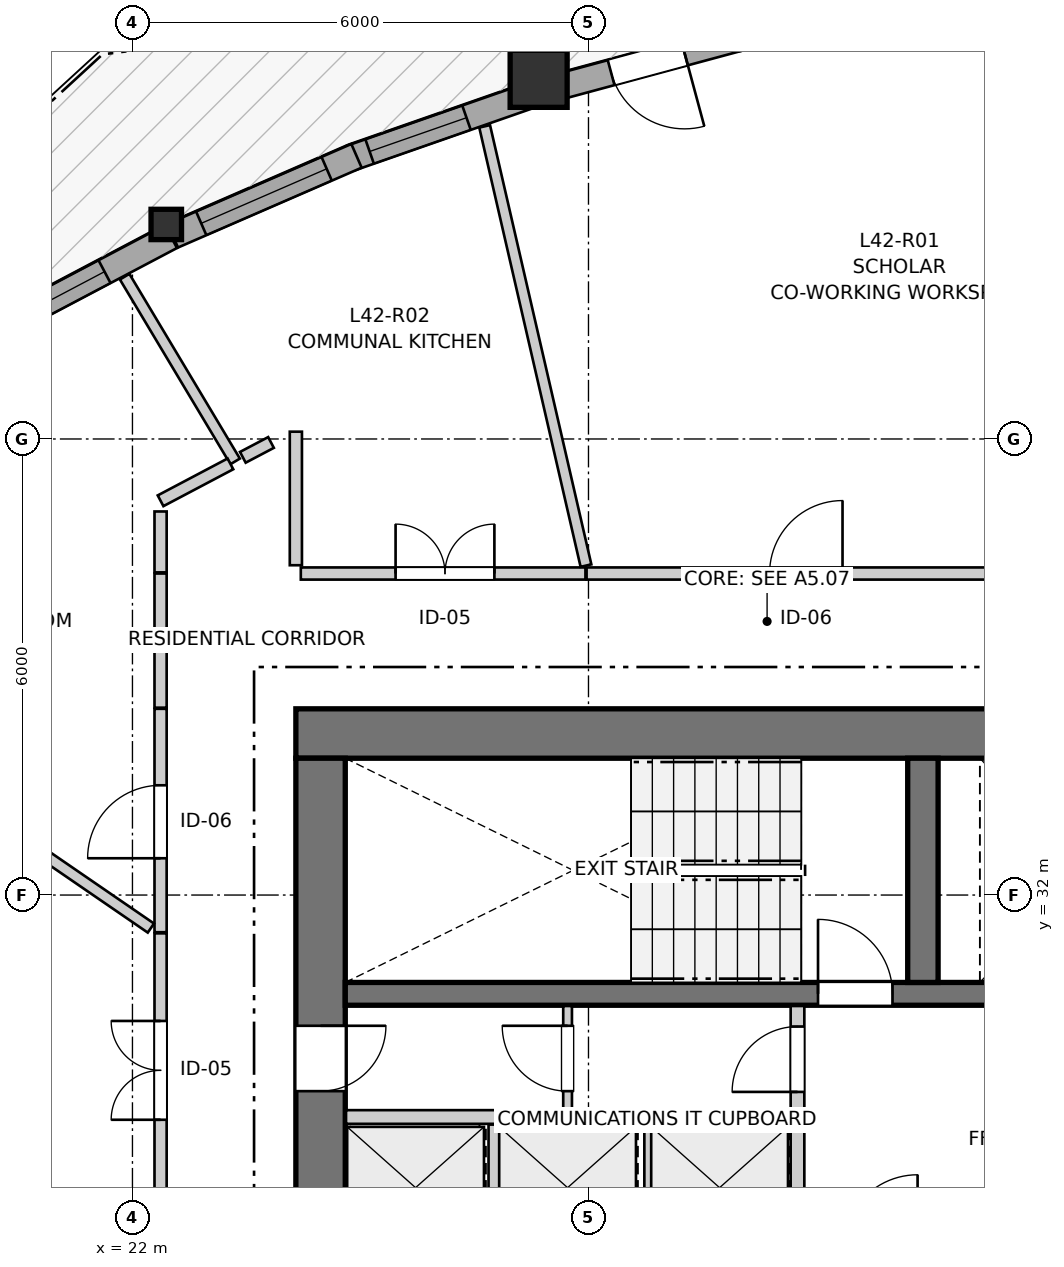
"""IFC4 building model, lengths in metres.
Left out: names, types, materials, properties, quantities, classifications, styles, units other than length and angle.
Written with IfcOpenShell. Run it as: python <this file> out.ifc"""

import sys

from ifc_helpers import new_model, si_unit, direction, frame, frame_2d, origin, origin_2d, place, context, subcontext, project, spatial, rectangle, i_section, extrude, source, transform, mapped, element, fill, save


model = new_model("IFC4")
c1 = context("Model", 3, precision=1e-05, world=origin(), true_north=direction((0.0, 1.0)))
c2 = subcontext(c1, "Body", "Model", "MODEL_VIEW")
j1 = project(units=[si_unit("LENGTHUNIT", "METRE"), si_unit("PLANEANGLEUNIT", "RADIAN")], contexts=[c1])
p1 = place(None, origin())
s1 = spatial("IfcSite", under=j1, at=p1, CompositionType="ELEMENT")
p2 = place(p1, origin())
s2 = spatial("IfcBuilding", under=s1, at=p2, CompositionType="ELEMENT")
p3 = place(p2, frame((0.0, 0.0, 142.6)))
s3 = spatial("IfcBuildingStorey", under=s2, at=p3, CompositionType="ELEMENT", Elevation=142.6)
p4 = place(p3, frame((36.55, 34.125, 0.0), z_axis=(0.0, 0.0, 1.0), x_axis=(-1.0, 0.0, 0.0)))
e1 = element("IfcWall", 1, at=p4, inside=s3, PredefinedType="SHEAR", context=c2, shape_type="SweptSolid", body=[
    extrude(rectangle(XDim=12.4, YDim=0.65, at=frame_2d((6.2, 0.0))), origin(), (0.0, 0.0, 1.0), 2.95),
])
p5 = place(p3, frame((24.475, 33.8, 0.0), z_axis=(0.0, 0.0, 1.0), x_axis=(0.0, -1.0, 0.0)))
e2 = element("IfcWall", 2, at=p5, inside=s3, PredefinedType="SHEAR", context=c2, shape_type="SweptSolid", body=[
    extrude(rectangle(XDim=15.6, YDim=0.65, at=frame_2d((7.8, 0.0))), origin(), (0.0, 0.0, 1.0), 2.95),
])
p6 = place(p5, frame((7.05, 0.0, 0.0)))
e3 = element("IfcOpeningElement", 3, at=p6, cuts=e2, PredefinedType="OPENING", context=c2, shape_type="SweptSolid", body=[
    extrude(rectangle(XDim=1.5, YDim=2.15, at=frame_2d((0.75, 1.075))), frame((0.0, 0.335, 0.0), z_axis=(0.0, -1.0, 0.0), x_axis=(1.0, 0.0, 0.0)), (0.0, 0.0, 1.0), 0.67),
])
p7 = place(p5, frame((3.52, 0.0, 0.0)))
e4 = element("IfcOpeningElement", 4, at=p7, cuts=e2, PredefinedType="OPENING", context=c2, shape_type="SweptSolid", body=[
    extrude(rectangle(XDim=0.86, YDim=2.05, at=frame_2d((0.43, 1.025))), frame((0.0, 0.335, 0.0), z_axis=(0.0, -1.0, 0.0), x_axis=(1.0, 0.0, 0.0)), (0.0, 0.0, 1.0), 0.67),
])
p8 = place(p5, frame((11.22, 0.0, 0.0)))
e5 = element("IfcOpeningElement", 5, at=p8, cuts=e2, PredefinedType="OPENING", context=c2, shape_type="SweptSolid", body=[
    extrude(rectangle(XDim=0.86, YDim=2.05, at=frame_2d((0.43, 1.025))), frame((0.0, 0.335, 0.0), z_axis=(0.0, -1.0, 0.0), x_axis=(1.0, 0.0, 0.0)), (0.0, 0.0, 1.0), 0.67),
])
p9 = place(p3, frame((24.8, 30.7, 0.0), z_axis=(0.0, 0.0, 1.0), x_axis=(1.0, 0.0, 0.0)))
e6 = element("IfcWall", 6, at=p9, inside=s3, PredefinedType="SHEAR", context=c2, shape_type="SweptSolid", body=[
    extrude(rectangle(XDim=11.1, YDim=0.3, at=frame_2d((5.55, 0.0))), origin(), (0.0, 0.0, 1.0), 2.95),
])
p10 = place(p9, frame((6.22, 0.0, 0.0)))
e7 = element("IfcOpeningElement", 7, at=p10, cuts=e6, PredefinedType="OPENING", context=c2, shape_type="SweptSolid", body=[
    extrude(rectangle(XDim=0.98, YDim=2.15, at=frame_2d((0.49, 1.075))), frame((0.0, 0.16, 0.0), z_axis=(0.0, -1.0, 0.0), x_axis=(1.0, 0.0, 0.0)), (0.0, 0.0, 1.0), 0.32),
])
p11 = place(p9, frame((9.15, 0.0, 0.0)))
e8 = element("IfcOpeningElement", 8, at=p11, cuts=e6, PredefinedType="OPENING", context=c2, shape_type="SweptSolid", body=[
    extrude(rectangle(XDim=1.15, YDim=2.15, at=frame_2d((0.575, 1.075))), frame((0.0, 0.16, 0.0), z_axis=(0.0, -1.0, 0.0), x_axis=(1.0, 0.0, 0.0)), (0.0, 0.0, 1.0), 0.32),
])
p12 = place(p3, frame((32.4, 30.85, 0.0), z_axis=(0.0, 0.0, 1.0), x_axis=(0.0, 1.0, 0.0)))
e9 = element("IfcWall", 9, at=p12, inside=s3, PredefinedType="SHEAR", context=c2, shape_type="SweptSolid", body=[
    extrude(rectangle(XDim=2.95, YDim=0.4, at=frame_2d((1.475, 0.0))), origin(), (0.0, 0.0, 1.0), 2.95),
])
m1 = source(origin(), c2, "Body", "SweptSolid", [
    extrude(rectangle(XDim=0.75, YDim=0.75, at=origin_2d()), origin(), (0.0, 0.0, 1.0), 2.95),
])
p13 = place(p3, frame((27.344, 42.738, 0.0), z_axis=(0.0, 0.0, 1.0), x_axis=(1.0, 0.0, 0.0)))
e10 = element("IfcColumn", 10, at=p13, inside=s3, PredefinedType="COLUMN", context=c2, shape_type="MappedRepresentation", body=[
    mapped(m1, transform((0.0, 0.0, 0.0), x_axis=(1.0, 0.0, 0.0), y_axis=(0.0, 1.0, 0.0), z_axis=(0.0, 0.0, 1.0), scale=1.0)),
])
m2 = source(origin(), c2, "Body", "SweptSolid", [
    extrude(i_section(OverallWidth=0.401, OverallDepth=0.399, WebThickness=0.023, FlangeThickness=0.036, FilletRadius=0.015, at=origin_2d()), origin(), (0.0, 0.0, 1.0), 2.95),
])
p14 = place(p3, frame((22.445, 40.822, 0.0), z_axis=(0.0, 0.0, 1.0), x_axis=(1.0, 0.0, 0.0)))
e11 = element("IfcColumn", 11, at=p14, inside=s3, PredefinedType="PILASTER", context=c2, shape_type="MappedRepresentation", body=[
    mapped(m2, transform((0.0, 0.0, 0.0), x_axis=(1.0, 0.0, 0.0), y_axis=(0.0, 1.0, 0.0), z_axis=(0.0, 0.0, 1.0), scale=1.0)),
])
p15 = place(p3, frame((30.023, 43.285, 0.0), z_axis=(0.0, 0.0, 1.0), x_axis=(-0.965478241218, -0.260483714913, 0.0)))
e12 = element("IfcWall", 12, at=p15, inside=s3, PredefinedType="SOLIDWALL", context=c2, shape_type="SweptSolid", body=[
    extrude(rectangle(XDim=2.574, YDim=0.34, at=frame_2d((1.287, 0.0))), origin(), (0.0, 0.0, 1.0), 2.53),
])
p16 = place(p15, frame((0.787, 0.0, 0.0)))
e13 = element("IfcOpeningElement", 13, at=p16, cuts=e12, PredefinedType="OPENING", context=c2, shape_type="SweptSolid", body=[
    extrude(rectangle(XDim=1.0, YDim=2.1, at=frame_2d((0.5, 1.05))), frame((0.0, 0.18, 0.0), z_axis=(0.0, -1.0, 0.0), x_axis=(1.0, 0.0, 0.0)), (0.0, 0.0, 1.0), 0.36),
])
p17 = place(p3, frame((27.254, 42.527, 0.0), z_axis=(0.0, 0.0, 1.0), x_axis=(-0.944140843313, -0.329542209721, 0.0)))
e14 = element("IfcWall", 14, at=p17, inside=s3, PredefinedType="SOLIDWALL", context=c2, shape_type="SweptSolid", body=[
    extrude(rectangle(XDim=2.53, YDim=0.34, at=frame_2d((1.265, 0.0))), origin(), (0.0, 0.0, 1.0), 2.53),
])
p18 = place(p17, frame((0.909, 0.0, 0.82)))
e15 = element("IfcOpeningElement", 15, at=p18, cuts=e14, PredefinedType="OPENING", context=c2, shape_type="SweptSolid", body=[
    extrude(rectangle(XDim=1.35, YDim=1.45, at=frame_2d((0.675, 0.725))), frame((0.0, 0.18, 0.0), z_axis=(0.0, -1.0, 0.0), x_axis=(1.0, 0.0, 0.0)), (0.0, 0.0, 1.0), 0.36),
])
p19 = place(p3, frame((24.948, 41.725, 0.0), z_axis=(0.0, 0.0, 1.0), x_axis=(-0.917067110524, -0.398732886523, 0.0)))
e16 = element("IfcWall", 16, at=p19, inside=s3, PredefinedType="SOLIDWALL", context=c2, shape_type="SweptSolid", body=[
    extrude(rectangle(XDim=2.635, YDim=0.34, at=frame_2d((1.318, 0.0))), origin(), (0.0, 0.0, 1.0), 2.53),
])
p20 = place(p19, frame((0.427, 0.0, 0.82)))
e17 = element("IfcOpeningElement", 17, at=p20, cuts=e16, PredefinedType="OPENING", context=c2, shape_type="SweptSolid", body=[
    extrude(rectangle(XDim=1.8, YDim=1.45, at=frame_2d((0.9, 0.725))), frame((0.0, 0.18, 0.0), z_axis=(0.0, -1.0, 0.0), x_axis=(1.0, 0.0, 0.0)), (0.0, 0.0, 1.0), 0.36),
])
p21 = place(p3, frame((22.507, 40.663, 0.0), z_axis=(0.0, 0.0, 1.0), x_axis=(-0.884410392718, -0.466710035517, 0.0)))
e18 = element("IfcWall", 18, at=p21, inside=s3, PredefinedType="SOLIDWALL", context=c2, shape_type="SweptSolid", body=[
    extrude(rectangle(XDim=2.62, YDim=0.34, at=frame_2d((1.31, 0.0))), origin(), (0.0, 0.0, 1.0), 2.53),
])
p22 = place(p21, frame((0.988, 0.0, 0.82)))
e19 = element("IfcOpeningElement", 19, at=p22, cuts=e18, PredefinedType="OPENING", context=c2, shape_type="SweptSolid", body=[
    extrude(rectangle(XDim=1.35, YDim=1.45, at=frame_2d((0.675, 0.725))), frame((0.0, 0.18, 0.0), z_axis=(0.0, -1.0, 0.0), x_axis=(1.0, 0.0, 0.0)), (0.0, 0.0, 1.0), 0.36),
])
p23 = place(p3, frame((30.75, 27.43, 0.0), z_axis=(0.0, 0.0, 1.0), x_axis=(0.0, 1.0, 0.0)))
e20 = element("IfcWall", 20, at=p23, inside=s3, PredefinedType="PARTITIONING", context=c2, shape_type="SweptSolid", body=[
    extrude(rectangle(XDim=3.11, YDim=0.18, at=frame_2d((1.555, 0.0))), origin(), (0.0, 0.0, 1.0), 2.95),
])
p24 = place(p23, frame((1.98, 0.0, 0.0)))
e21 = element("IfcOpeningElement", 21, at=p24, cuts=e20, PredefinedType="OPENING", context=c2, shape_type="SweptSolid", body=[
    extrude(rectangle(XDim=0.86, YDim=2.05, at=frame_2d((0.43, 1.025))), frame((0.0, 0.1, 0.0), z_axis=(0.0, -1.0, 0.0), x_axis=(1.0, 0.0, 0.0)), (0.0, 0.0, 1.0), 0.2),
])
p25 = place(p3, frame((24.81, 29.08, 0.0), z_axis=(0.0, 0.0, 1.0), x_axis=(1.0, 0.0, 0.0)))
e22 = element("IfcWall", 22, at=p25, inside=s3, PredefinedType="PARTITIONING", context=c2, shape_type="SweptSolid", body=[
    extrude(rectangle(XDim=5.84, YDim=0.18, at=frame_2d((2.92, 0.0))), origin(), (0.0, 0.0, 1.0), 2.95),
])
for number, where, z_axis, x_axis in (
    (23, (26.775, 27.2, 0.0), (0.0, 0.0, 1.0), (0.0, 1.0, 0.0)),
    (24, (28.825, 27.2, 0.0), (0.0, 0.0, 1.0), (0.0, 1.0, 0.0)),
):
    element("IfcWall", number, at=place(p3, frame(where, z_axis=z_axis, x_axis=x_axis)), inside=s3, PredefinedType="PARTITIONING", context=c2, shape_type="SweptSolid", body=[
        extrude(rectangle(XDim=1.78, YDim=0.18, at=frame_2d((0.89, 0.0))), origin(), (0.0, 0.0, 1.0), 2.95),
    ])
p26 = place(p3, frame((27.725, 29.16, 0.0), z_axis=(0.0, 0.0, 1.0), x_axis=(0.0, 1.0, 0.0)))
e25 = element("IfcWall", 25, at=p26, inside=s3, PredefinedType="PARTITIONING", context=c2, shape_type="SweptSolid", body=[
    extrude(rectangle(XDim=1.38, YDim=0.115, at=frame_2d((0.69, 0.0))), origin(), (0.0, 0.0, 1.0), 2.95),
])
p27 = place(p26, frame((0.26, 0.0, 0.0)))
e26 = element("IfcOpeningElement", 26, at=p27, cuts=e25, PredefinedType="OPENING", context=c2, shape_type="SweptSolid", body=[
    extrude(rectangle(XDim=0.86, YDim=2.05, at=frame_2d((0.43, 1.025))), frame((0.0, 0.067, 0.0), z_axis=(0.0, -1.0, 0.0), x_axis=(1.0, 0.0, 0.0)), (0.0, 0.0, 1.0), 0.135),
])
p28 = place(p3, frame((27.975, 36.23, 0.0), z_axis=(0.0, 0.0, 1.0), x_axis=(1.0, 0.0, 0.0)))
e27 = element("IfcWall", 27, at=p28, inside=s3, PredefinedType="PARTITIONING", context=c2, shape_type="SweptSolid", body=[
    extrude(rectangle(XDim=5.775, YDim=0.16, at=frame_2d((2.887, 0.0))), origin(), (0.0, 0.0, 1.0), 2.588),
])
p29 = place(p28, frame((2.407, 0.0, 0.0)))
e28 = element("IfcOpeningElement", 28, at=p29, cuts=e27, PredefinedType="OPENING", context=c2, shape_type="SweptSolid", body=[
    extrude(rectangle(XDim=0.96, YDim=2.1, at=frame_2d((0.48, 1.05))), frame((0.0, 0.09, 0.0), z_axis=(0.0, -1.0, 0.0), x_axis=(1.0, 0.0, 0.0)), (0.0, 0.0, 1.0), 0.18),
])
p30 = place(p3, frame((24.215, 36.23, 0.0), z_axis=(0.0, 0.0, 1.0), x_axis=(1.0, 0.0, 0.0)))
e29 = element("IfcWall", 29, at=p30, inside=s3, PredefinedType="PARTITIONING", context=c2, shape_type="SweptSolid", body=[
    extrude(rectangle(XDim=3.745, YDim=0.16, at=frame_2d((1.873, 0.0))), origin(), (0.0, 0.0, 1.0), 2.95),
])
p31 = place(p30, frame((1.247, 0.0, 0.0)))
e30 = element("IfcOpeningElement", 30, at=p31, cuts=e29, PredefinedType="OPENING", context=c2, shape_type="SweptSolid", body=[
    extrude(rectangle(XDim=1.3, YDim=2.1, at=frame_2d((0.65, 1.05))), frame((0.0, 0.09, 0.0), z_axis=(0.0, -1.0, 0.0), x_axis=(1.0, 0.0, 0.0)), (0.0, 0.0, 1.0), 0.18),
])
p32 = place(p3, frame((22.37, 27.85, 0.0), z_axis=(0.0, 0.0, 1.0), x_axis=(0.0, 1.0, 0.0)))
e31 = element("IfcWall", 31, at=p32, inside=s3, PredefinedType="PARTITIONING", context=c2, shape_type="SweptSolid", body=[
    extrude(rectangle(XDim=3.646, YDim=0.16, at=frame_2d((1.823, 0.0))), origin(), (0.0, 0.0, 1.0), 2.95),
])
p33 = place(p32, frame((1.194, 0.0, 0.0)))
e32 = element("IfcOpeningElement", 32, at=p33, cuts=e31, PredefinedType="OPENING", context=c2, shape_type="SweptSolid", body=[
    extrude(rectangle(XDim=1.3, YDim=2.1, at=frame_2d((0.65, 1.05))), frame((0.0, 0.09, 0.0), z_axis=(0.0, -1.0, 0.0), x_axis=(1.0, 0.0, 0.0)), (0.0, 0.0, 1.0), 0.18),
])
p34 = place(p3, frame((22.37, 31.511, 0.0), z_axis=(0.0, 0.0, 1.0), x_axis=(0.0, 1.0, 0.0)))
e33 = element("IfcWall", 33, at=p34, inside=s3, PredefinedType="PARTITIONING", context=c2, shape_type="SweptSolid", body=[
    extrude(rectangle(XDim=2.939, YDim=0.16, at=frame_2d((1.469, 0.0))), origin(), (0.0, 0.0, 1.0), 2.95),
])
p35 = place(p34, frame((0.973, 0.0, 0.0)))
e34 = element("IfcOpeningElement", 34, at=p35, cuts=e33, PredefinedType="OPENING", context=c2, shape_type="SweptSolid", body=[
    extrude(rectangle(XDim=0.96, YDim=2.1, at=frame_2d((0.48, 1.05))), frame((0.0, 0.09, 0.0), z_axis=(0.0, -1.0, 0.0), x_axis=(1.0, 0.0, 0.0)), (0.0, 0.0, 1.0), 0.18),
])
p36 = place(p3, frame((15.696, 36.06, 0.0), z_axis=(0.0, 0.0, 1.0), x_axis=(0.824423900824, -0.565972818914, 0.0)))
e35 = element("IfcWall", 35, at=p36, inside=s3, PredefinedType="PARTITIONING", context=c2, shape_type="SweptSolid", body=[
    extrude(rectangle(XDim=7.941, YDim=0.145, at=frame_2d((3.97, 0.0))), origin(), (0.0, 0.0, 1.0), 2.95),
])
p37 = place(p3, frame((26.634, 42.113, 0.0), z_axis=(0.0, 0.0, 1.0), x_axis=(0.224790361783, -0.97440714963, 0.0)))
e36 = element("IfcWall", 36, at=p37, inside=s3, PredefinedType="PARTITIONING", context=c2, shape_type="SweptSolid", body=[
    extrude(rectangle(XDim=5.931, YDim=0.145, at=frame_2d((2.966, 0.0))), origin(), (0.0, 0.0, 1.0), 2.95),
])
p38 = place(p3, frame((21.897, 40.135, 0.0), z_axis=(0.0, 0.0, 1.0), x_axis=(0.513392323606, -0.858154020012, 0.0)))
e37 = element("IfcWall", 37, at=p38, inside=s3, PredefinedType="PARTITIONING", context=c2, shape_type="SweptSolid", body=[
    extrude(rectangle(XDim=2.832, YDim=0.145, at=frame_2d((1.416, 0.0))), origin(), (0.0, 0.0, 1.0), 2.95),
])
p39 = place(p3, frame((22.37, 34.465, 0.0), z_axis=(0.0, 0.0, 1.0), x_axis=(0.0, 1.0, 0.0)))
e38 = element("IfcWall", 38, at=p39, inside=s3, PredefinedType="PARTITIONING", context=c2, shape_type="SweptSolid", body=[
    extrude(rectangle(XDim=1.765, YDim=0.16, at=frame_2d((0.882, 0.0))), origin(), (0.0, 0.0, 1.0), 2.95),
])
p40 = place(p3, frame((24.15, 36.339, 0.0), z_axis=(0.0, 0.0, 1.0), x_axis=(0.0, 1.0, 0.0)))
e39 = element("IfcWall", 39, at=p40, inside=s3, PredefinedType="PARTITIONING", context=c2, shape_type="SweptSolid", body=[
    extrude(rectangle(XDim=1.757, YDim=0.16, at=frame_2d((0.878, 0.0))), origin(), (0.0, 0.0, 1.0), 2.95),
])
p41 = place(p3, frame((22.37, 37.187, 0.0), z_axis=(0.0, 0.0, 1.0), x_axis=(0.884244639112, 0.467024001741, 0.0)))
e40 = element("IfcWall", 40, at=p41, inside=s3, PredefinedType="PARTITIONING", context=c2, shape_type="SweptSolid", body=[
    extrude(rectangle(XDim=1.039, YDim=0.16, at=frame_2d((0.52, 0.0))), origin(), (0.0, 0.0, 1.0), 2.558),
])
p42 = place(p3, frame((22.37, 36.245, 0.0), z_axis=(0.0, 0.0, 1.0), x_axis=(0.0, 1.0, 0.0)))
e41 = element("IfcWall", 41, at=p42, inside=s3, PredefinedType="PARTITIONING", context=c2, shape_type="SweptSolid", body=[
    extrude(rectangle(XDim=0.801, YDim=0.16, at=frame_2d((0.401, 0.0))), origin(), (0.0, 0.0, 1.0), 2.95),
])
p43 = place(p3, frame((23.452, 37.759, 0.0), z_axis=(0.0, 0.0, 1.0), x_axis=(0.884665257528, 0.466226749686, 0.0)))
e42 = element("IfcWall", 42, at=p43, inside=s3, PredefinedType="PARTITIONING", context=c2, shape_type="SweptSolid", body=[
    extrude(rectangle(XDim=0.419, YDim=0.16, at=frame_2d((0.209, 0.0))), origin(), (0.0, 0.0, 1.0), 2.558),
])
m3 = source(origin(), c2, "Body", "SweptSolid", [
    extrude(rectangle(XDim=1.35, YDim=1.45, at=frame_2d((0.675, 0.725))), frame((0.0, 0.03, 0.0), z_axis=(0.0, -1.0, 0.0), x_axis=(1.0, 0.0, 0.0)), (0.0, 0.0, 1.0), 0.06),
])
p44 = place(p18, origin())
e43 = element("IfcWindow", 43, at=p44, inside=s3, PartitioningType="SINGLE_PANEL", PredefinedType="WINDOW", context=c2, shape_type="MappedRepresentation", body=[
    mapped(m3, transform((0.0, 0.0, 0.0), x_axis=(1.0, 0.0, 0.0), y_axis=(0.0, 1.0, 0.0), z_axis=(0.0, 0.0, 1.0), scale=1.0)),
])
fill(e15, e43)
m4 = source(origin(), c2, "Body", "SweptSolid", [
    extrude(rectangle(XDim=1.8, YDim=1.45, at=frame_2d((0.9, 0.725))), frame((0.0, 0.03, 0.0), z_axis=(0.0, -1.0, 0.0), x_axis=(1.0, 0.0, 0.0)), (0.0, 0.0, 1.0), 0.06),
])
p45 = place(p20, origin())
e44 = element("IfcWindow", 44, at=p45, inside=s3, PartitioningType="SINGLE_PANEL", PredefinedType="WINDOW", context=c2, shape_type="MappedRepresentation", body=[
    mapped(m4, transform((0.0, 0.0, 0.0), x_axis=(1.0, 0.0, 0.0), y_axis=(0.0, 1.0, 0.0), z_axis=(0.0, 0.0, 1.0), scale=1.0)),
])
fill(e17, e44)
p46 = place(p22, origin())
e45 = element("IfcWindow", 45, at=p46, inside=s3, PartitioningType="SINGLE_PANEL", PredefinedType="WINDOW", context=c2, shape_type="MappedRepresentation", body=[
    mapped(m3, transform((0.0, 0.0, 0.0), x_axis=(1.0, 0.0, 0.0), y_axis=(0.0, 1.0, 0.0), z_axis=(0.0, 0.0, 1.0), scale=1.0)),
])
fill(e19, e45)
m5 = source(origin(), c2, "Body", "SweptSolid", [
    extrude(rectangle(XDim=1.0, YDim=2.1, at=frame_2d((0.5, 1.05))), frame((0.0, 0.025, 0.0), z_axis=(0.0, -1.0, 0.0), x_axis=(1.0, 0.0, 0.0)), (0.0, 0.0, 1.0), 0.05),
])
p47 = place(p16, origin())
e46 = element("IfcDoor", 46, at=p47, inside=s3, OperationType="SINGLE_SWING_LEFT", PredefinedType="DOOR", context=c2, shape_type="MappedRepresentation", body=[
    mapped(m5, transform((0.0, 0.0, 0.0), x_axis=(1.0, 0.0, 0.0), y_axis=(0.0, 1.0, 0.0), z_axis=(0.0, 0.0, 1.0), scale=1.0)),
])
fill(e13, e46)
m6 = source(origin(), c2, "Body", "SweptSolid", [
    extrude(rectangle(XDim=0.98, YDim=2.15, at=frame_2d((0.49, 1.075))), frame((0.0, 0.025, 0.0), z_axis=(0.0, -1.0, 0.0), x_axis=(1.0, 0.0, 0.0)), (0.0, 0.0, 1.0), 0.05),
])
p48 = place(p10, origin())
e47 = element("IfcDoor", 47, at=p48, inside=s3, OperationType="SINGLE_SWING_LEFT", PredefinedType="DOOR", context=c2, shape_type="MappedRepresentation", body=[
    mapped(m6, transform((0.0, 0.0, 0.0), x_axis=(1.0, 0.0, 0.0), y_axis=(0.0, 1.0, 0.0), z_axis=(0.0, 0.0, 1.0), scale=1.0)),
])
fill(e7, e47)
m7 = source(origin(), c2, "Body", "SweptSolid", [
    extrude(rectangle(XDim=0.86, YDim=2.05, at=frame_2d((0.43, 1.025))), frame((0.0, 0.025, 0.0), z_axis=(0.0, -1.0, 0.0), x_axis=(1.0, 0.0, 0.0)), (0.0, 0.0, 1.0), 0.05),
])
p49 = place(p7, origin())
e48 = element("IfcDoor", 48, at=p49, inside=s3, OperationType="SINGLE_SWING_LEFT", PredefinedType="DOOR", context=c2, shape_type="MappedRepresentation", body=[
    mapped(m7, transform((0.0, 0.0, 0.0), x_axis=(1.0, 0.0, 0.0), y_axis=(0.0, 1.0, 0.0), z_axis=(0.0, 0.0, 1.0), scale=1.0)),
])
fill(e4, e48)
p50 = place(p24, origin())
e49 = element("IfcDoor", 49, at=p50, inside=s3, OperationType="SINGLE_SWING_LEFT", PredefinedType="DOOR", context=c2, shape_type="MappedRepresentation", body=[
    mapped(m7, transform((0.0, 0.0, 0.0), x_axis=(1.0, 0.0, 0.0), y_axis=(0.0, 1.0, 0.0), z_axis=(0.0, 0.0, 1.0), scale=1.0)),
])
fill(e21, e49)
p51 = place(p27, origin())
e50 = element("IfcDoor", 50, at=p51, inside=s3, OperationType="SINGLE_SWING_RIGHT", PredefinedType="DOOR", context=c2, shape_type="MappedRepresentation", body=[
    mapped(m7, transform((0.0, 0.0, 0.0), x_axis=(1.0, 0.0, 0.0), y_axis=(0.0, 1.0, 0.0), z_axis=(0.0, 0.0, 1.0), scale=1.0)),
])
fill(e26, e50)
m8 = source(origin(), c2, "Body", "SweptSolid", [
    extrude(rectangle(XDim=0.96, YDim=2.1, at=frame_2d((0.48, 1.05))), frame((0.0, 0.025, 0.0), z_axis=(0.0, -1.0, 0.0), x_axis=(1.0, 0.0, 0.0)), (0.0, 0.0, 1.0), 0.05),
])
p52 = place(p29, origin())
e51 = element("IfcDoor", 51, at=p52, inside=s3, OperationType="SINGLE_SWING_RIGHT", PredefinedType="DOOR", context=c2, shape_type="MappedRepresentation", body=[
    mapped(m8, transform((0.0, 0.0, 0.0), x_axis=(1.0, 0.0, 0.0), y_axis=(0.0, 1.0, 0.0), z_axis=(0.0, 0.0, 1.0), scale=1.0)),
])
fill(e28, e51)
m9 = source(origin(), c2, "Body", "SweptSolid", [
    extrude(rectangle(XDim=1.3, YDim=2.1, at=frame_2d((0.65, 1.05))), frame((0.0, 0.025, 0.0), z_axis=(0.0, -1.0, 0.0), x_axis=(1.0, 0.0, 0.0)), (0.0, 0.0, 1.0), 0.05),
])
p53 = place(p31, origin())
e52 = element("IfcDoor", 52, at=p53, inside=s3, OperationType="DOUBLE_DOOR_SINGLE_SWING", PredefinedType="DOOR", context=c2, shape_type="MappedRepresentation", body=[
    mapped(m9, transform((0.0, 0.0, 0.0), x_axis=(1.0, 0.0, 0.0), y_axis=(0.0, 1.0, 0.0), z_axis=(0.0, 0.0, 1.0), scale=1.0)),
])
fill(e30, e52)
p54 = place(p33, origin())
e53 = element("IfcDoor", 53, at=p54, inside=s3, OperationType="DOUBLE_DOOR_SINGLE_SWING", PredefinedType="DOOR", context=c2, shape_type="MappedRepresentation", body=[
    mapped(m9, transform((0.0, 0.0, 0.0), x_axis=(1.0, 0.0, 0.0), y_axis=(0.0, 1.0, 0.0), z_axis=(0.0, 0.0, 1.0), scale=1.0)),
])
fill(e32, e53)
p55 = place(p35, origin())
e54 = element("IfcDoor", 54, at=p55, inside=s3, OperationType="SINGLE_SWING_LEFT", PredefinedType="DOOR", context=c2, shape_type="MappedRepresentation", body=[
    mapped(m8, transform((0.0, 0.0, 0.0), x_axis=(1.0, 0.0, 0.0), y_axis=(0.0, 1.0, 0.0), z_axis=(0.0, 0.0, 1.0), scale=1.0)),
])
fill(e34, e54)
save(model, sys.argv[1])
